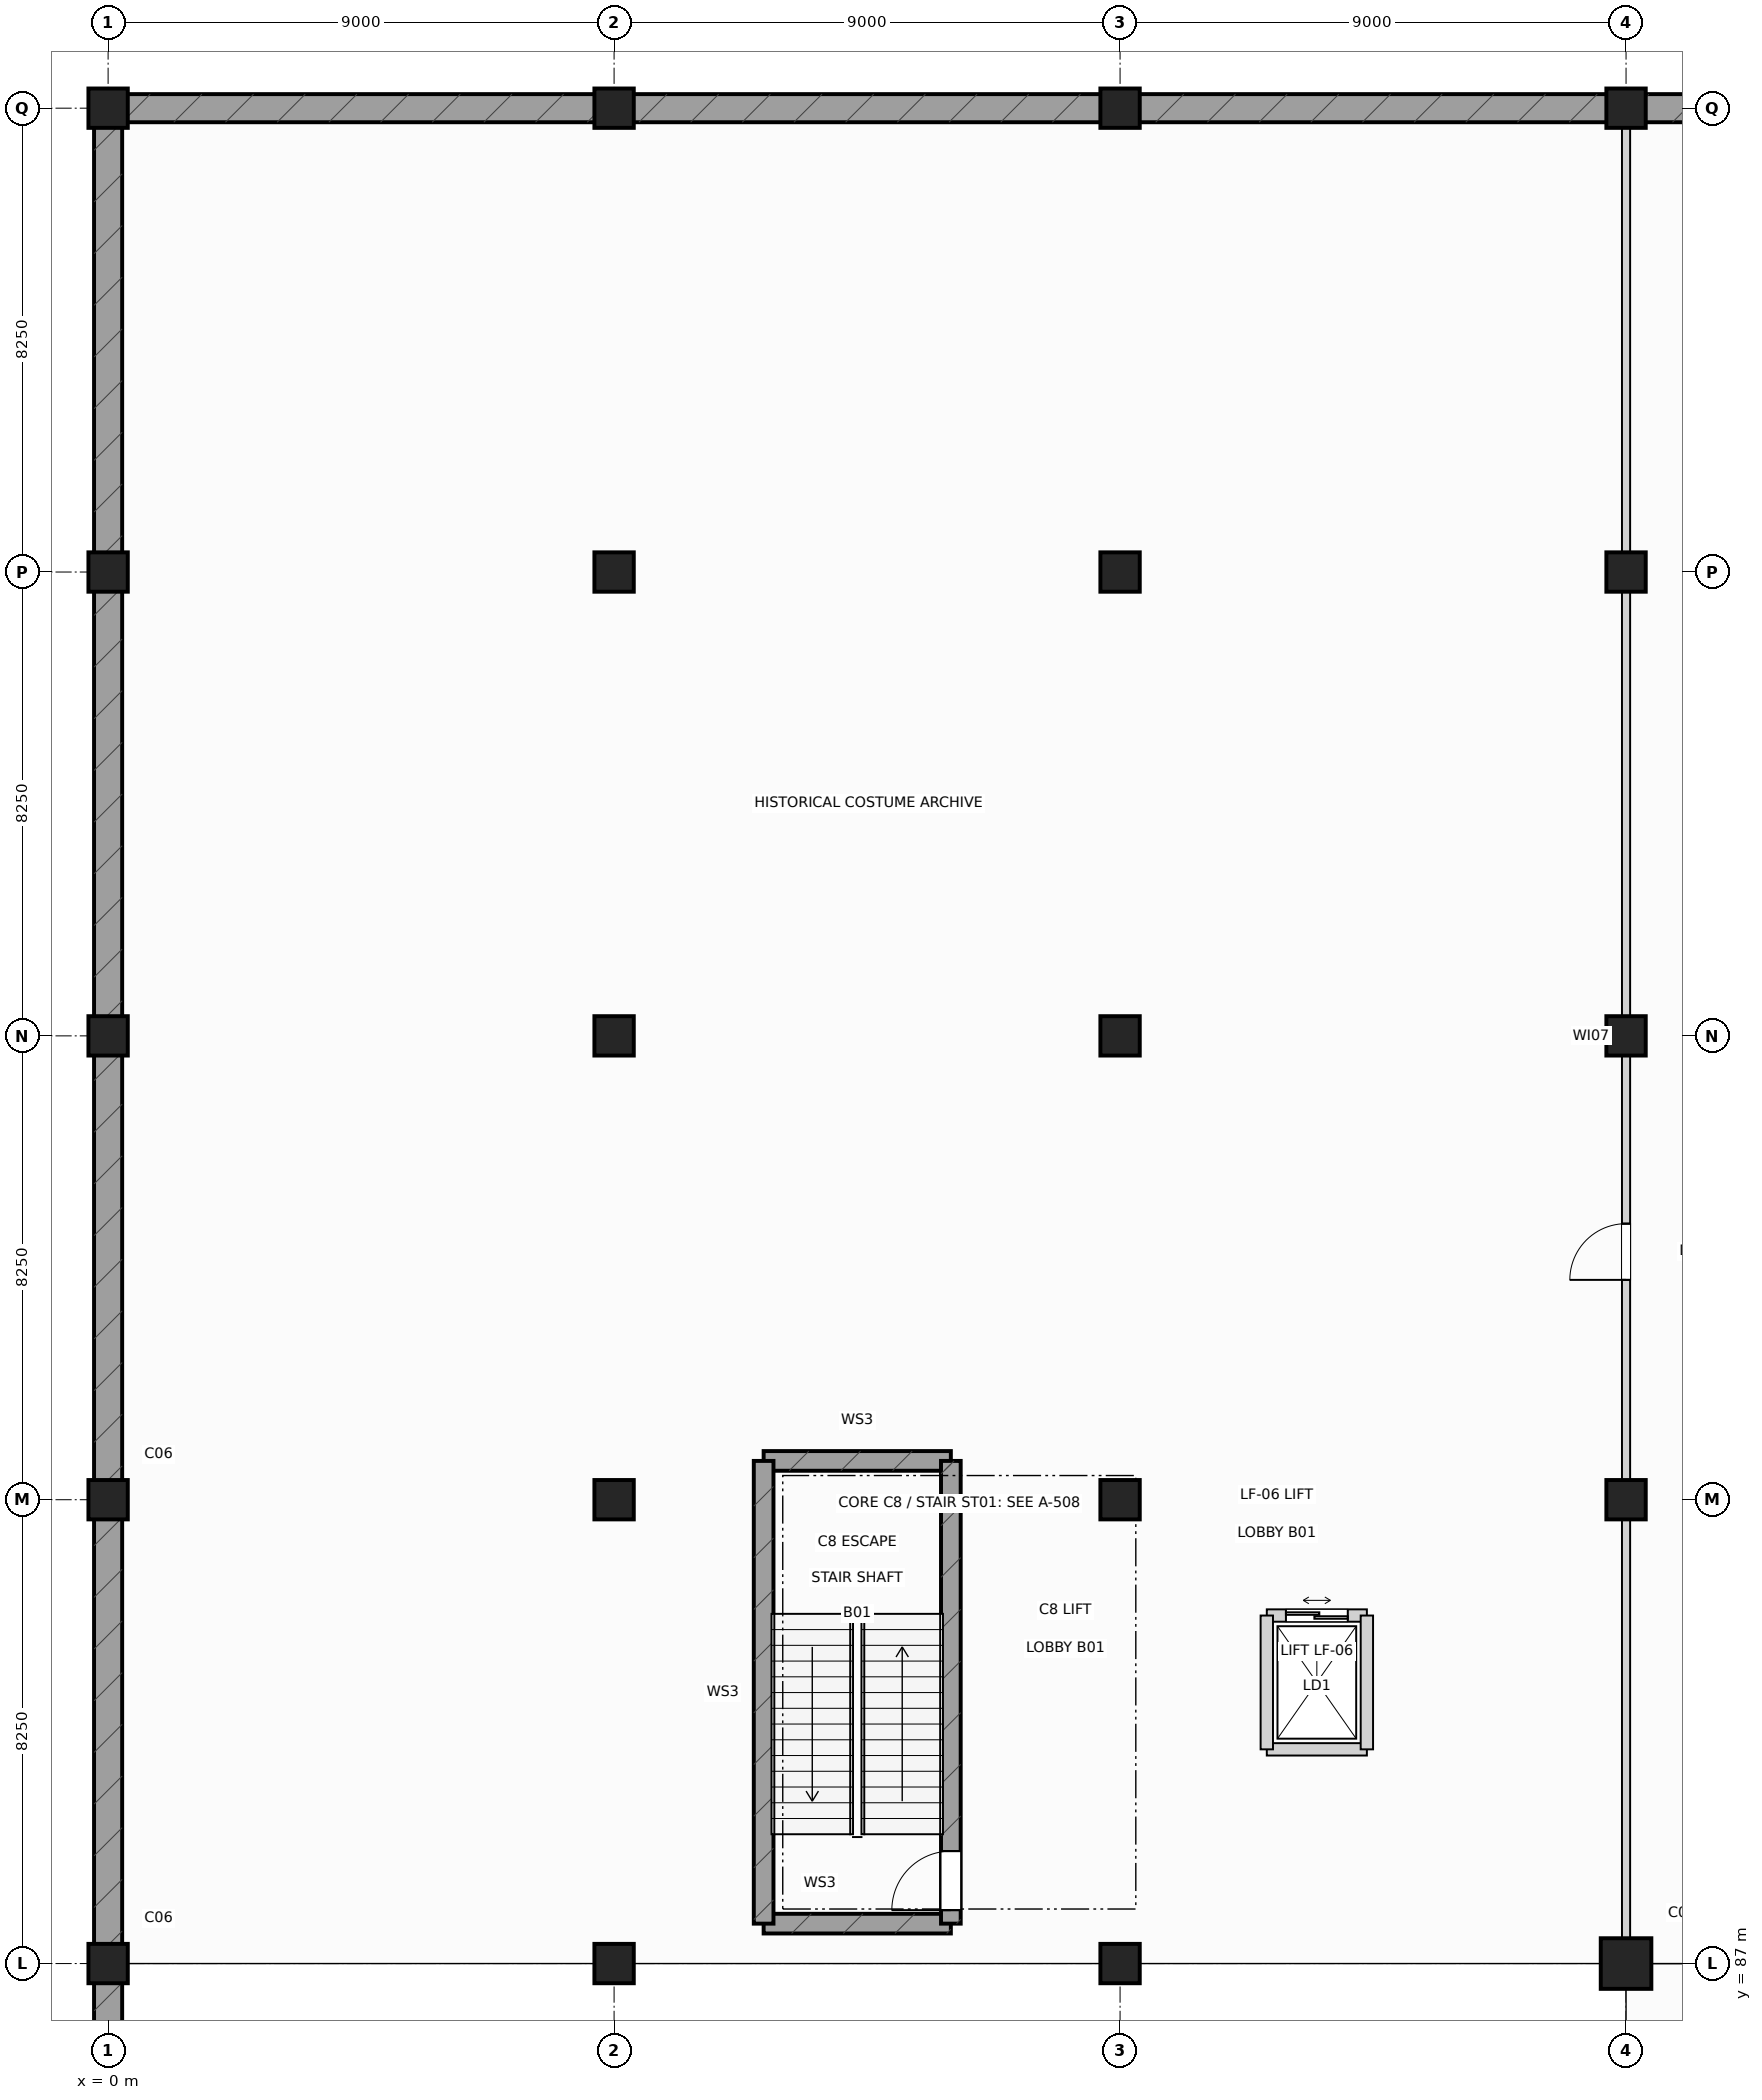
"""IFC4 building model, lengths in metres.
Left out: names, types, materials, properties, quantities, classifications, styles, units other than length and angle.
Written with IfcOpenShell. Run it as: python <this file> out.ifc"""

import sys

from ifc_helpers import new_model, si_unit, direction, frame, frame_2d, origin, origin_2d, place, context, subcontext, project, spatial, rectangle, hollow_circle, extrude, element, fill, save


model = new_model("IFC4")
c1 = context("Model", 3, precision=1e-05, world=origin(), true_north=direction((0.0, 1.0)))
c2 = subcontext(c1, "Body", "Model", "MODEL_VIEW")
j1 = project(units=[si_unit("LENGTHUNIT", "METRE"), si_unit("PLANEANGLEUNIT", "RADIAN")], contexts=[c1])
p1 = place(None, origin())
s1 = spatial("IfcSite", under=j1, at=p1, CompositionType="ELEMENT")
p2 = place(p1, origin())
s2 = spatial("IfcBuilding", under=s1, at=p2, CompositionType="ELEMENT")
p3 = place(p2, frame((0.0, 0.0, -5.4)))
s3 = spatial("IfcBuildingStorey", under=s2, at=p3, CompositionType="ELEMENT", Elevation=-5.4)
for number, where, z_axis, x_axis in (
    (1, (0.0, 87.0, 0.0), (0.0, 0.0, 1.0), (1.0, 0.0, 0.0)),
    (2, (0.0, 95.25, 0.0), (0.0, 0.0, 1.0), (1.0, 0.0, 0.0)),
    (3, (0.0, 103.5, 0.0), (0.0, 0.0, 1.0), (1.0, 0.0, 0.0)),
    (4, (0.0, 111.75, 0.0), (0.0, 0.0, 1.0), (1.0, 0.0, 0.0)),
    (5, (0.0, 120.0, 0.0), (0.0, 0.0, 1.0), (1.0, 0.0, 0.0)),
    (6, (9.0, 87.0, 0.0), (0.0, 0.0, 1.0), (1.0, 0.0, 0.0)),
    (7, (9.0, 95.25, 0.0), (0.0, 0.0, 1.0), (1.0, 0.0, 0.0)),
    (8, (9.0, 103.5, 0.0), (0.0, 0.0, 1.0), (1.0, 0.0, 0.0)),
    (9, (9.0, 111.75, 0.0), (0.0, 0.0, 1.0), (1.0, 0.0, 0.0)),
    (10, (9.0, 120.0, 0.0), (0.0, 0.0, 1.0), (1.0, 0.0, 0.0)),
    (11, (18.0, 87.0, 0.0), (0.0, 0.0, 1.0), (1.0, 0.0, 0.0)),
    (12, (18.0, 95.25, 0.0), (0.0, 0.0, 1.0), (1.0, 0.0, 0.0)),
    (13, (18.0, 103.5, 0.0), (0.0, 0.0, 1.0), (1.0, 0.0, 0.0)),
    (14, (18.0, 111.75, 0.0), (0.0, 0.0, 1.0), (1.0, 0.0, 0.0)),
    (15, (18.0, 120.0, 0.0), (0.0, 0.0, 1.0), (1.0, 0.0, 0.0)),
):
    element("IfcColumn", number, at=place(p3, frame(where, z_axis=z_axis, x_axis=x_axis)), inside=s3, PredefinedType="COLUMN", context=c2, shape_type="SweptSolid", body=[
        extrude(rectangle(XDim=0.7, YDim=0.7, at=origin_2d()), origin(), (0.0, 0.0, 1.0), 5.4),
    ])
p4 = place(p3, frame((27.0, 87.0, 0.0), z_axis=(0.0, 0.0, 1.0), x_axis=(1.0, 0.0, 0.0)))
e16 = element("IfcColumn", 16, at=p4, inside=s3, PredefinedType="COLUMN", context=c2, shape_type="SweptSolid", body=[
    extrude(rectangle(XDim=0.9, YDim=0.9, at=origin_2d()), origin(), (0.0, 0.0, 1.0), 5.4),
])
for number, where, z_axis, x_axis in (
    (17, (27.0, 95.25, 0.0), (0.0, 0.0, 1.0), (1.0, 0.0, 0.0)),
    (18, (27.0, 103.5, 0.0), (0.0, 0.0, 1.0), (1.0, 0.0, 0.0)),
    (19, (27.0, 111.75, 0.0), (0.0, 0.0, 1.0), (1.0, 0.0, 0.0)),
    (20, (27.0, 120.0, 0.0), (0.0, 0.0, 1.0), (1.0, 0.0, 0.0)),
):
    element("IfcColumn", number, at=place(p3, frame(where, z_axis=z_axis, x_axis=x_axis)), inside=s3, PredefinedType="COLUMN", context=c2, shape_type="SweptSolid", body=[
        extrude(rectangle(XDim=0.7, YDim=0.7, at=origin_2d()), origin(), (0.0, 0.0, 1.0), 5.4),
    ])
p5 = place(p3, frame((0.0, 0.0, 0.0), z_axis=(0.0, 0.0, 1.0), x_axis=(0.0, 1.0, 0.0)))
e21 = element("IfcWall", 21, at=p5, inside=s3, PredefinedType="USERDEFINED", context=c2, shape_type="SweptSolid", body=[
    extrude(rectangle(XDim=120.0, YDim=0.5, at=frame_2d((60.0, 0.0))), origin(), (0.0, 0.0, 1.0), 5.08),
])
p6 = place(p3, frame((0.0, 120.0, 0.0), z_axis=(0.0, 0.0, 1.0), x_axis=(1.0, 0.0, 0.0)))
e22 = element("IfcWall", 22, at=p6, inside=s3, PredefinedType="USERDEFINED", context=c2, shape_type="SweptSolid", body=[
    extrude(rectangle(XDim=81.0, YDim=0.5, at=frame_2d((40.5, 0.0))), origin(), (0.0, 0.0, 1.0), 5.08),
])
p7 = place(p3, frame((33.8, 80.2, 0.0), z_axis=(-0.371927502201, 0.371927502201, 0.850493895459), x_axis=(-0.707106781187, -0.707106781187, 0.0)))
e23 = element("IfcColumn", 23, at=p7, inside=s3, PredefinedType="COLUMN", context=c2, shape_type="SweptSolid", body=[
    extrude(hollow_circle(Radius=0.254, WallThickness=0.025, at=origin_2d()), origin(), (0.0, 0.0, 1.0), 18.283),
])
for number, where, z_axis, x_axis in (
    (24, (11.66, 87.71, 0.0), (0.0, 0.0, 1.0), (1.0, 0.0, 0.0)),
    (25, (11.66, 95.94, 0.0), (0.0, 0.0, 1.0), (1.0, 0.0, 0.0)),
):
    element("IfcWall", number, at=place(p3, frame(where, z_axis=z_axis, x_axis=x_axis)), inside=s3, PredefinedType="SHEAR", context=c2, shape_type="SweptSolid", body=[
        extrude(rectangle(XDim=3.33, YDim=0.35, at=frame_2d((1.665, 0.0))), origin(), (0.0, 0.0, 1.0), 5.08),
    ])
p8 = place(p3, frame((11.66, 87.71, 0.0), z_axis=(0.0, 0.0, 1.0), x_axis=(0.0, 1.0, 0.0)))
e26 = element("IfcWall", 26, at=p8, inside=s3, PredefinedType="SHEAR", context=c2, shape_type="SweptSolid", body=[
    extrude(rectangle(XDim=8.23, YDim=0.35, at=frame_2d((4.115, 0.0))), origin(), (0.0, 0.0, 1.0), 5.08),
])
p9 = place(p3, frame((14.99, 87.71, 0.0), z_axis=(0.0, 0.0, 1.0), x_axis=(0.0, 1.0, 0.0)))
e27 = element("IfcWall", 27, at=p9, inside=s3, PredefinedType="SHEAR", context=c2, shape_type="SweptSolid", body=[
    extrude(rectangle(XDim=8.23, YDim=0.35, at=frame_2d((4.115, 0.0))), origin(), (0.0, 0.0, 1.0), 5.08),
])
p10 = place(p9, frame((0.24, 0.0, 0.0)))
e28 = element("IfcOpeningElement", 28, at=p10, cuts=e27, PredefinedType="OPENING", context=c2, shape_type="SweptSolid", body=[
    extrude(rectangle(XDim=1.05, YDim=2.18, at=frame_2d((0.525, 1.09))), frame((0.0, 0.185, 0.0), z_axis=(0.0, -1.0, 0.0), x_axis=(1.0, 0.0, 0.0)), (0.0, 0.0, 1.0), 0.37),
])
p11 = place(p3, frame((20.61, 90.81, 0.0), z_axis=(0.0, 0.0, 1.0), x_axis=(1.0, 0.0, 0.0)))
e29 = element("IfcWall", 29, at=p11, inside=s3, PredefinedType="PARTITIONING", context=c2, shape_type="SweptSolid", body=[
    extrude(rectangle(XDim=1.78, YDim=0.22, at=frame_2d((0.89, 0.0))), origin(), (0.0, 0.0, 1.0), 5.045),
])
p12 = place(p3, frame((20.61, 93.19, 0.0), z_axis=(0.0, 0.0, 1.0), x_axis=(1.0, 0.0, 0.0)))
e30 = element("IfcWall", 30, at=p12, inside=s3, PredefinedType="PARTITIONING", context=c2, shape_type="SweptSolid", body=[
    extrude(rectangle(XDim=1.78, YDim=0.22, at=frame_2d((0.89, 0.0))), origin(), (0.0, 0.0, 1.0), 5.045),
])
p13 = place(p12, frame((0.34, 0.0, 0.0)))
e31 = element("IfcOpeningElement", 31, at=p13, cuts=e30, PredefinedType="OPENING", context=c2, shape_type="SweptSolid", body=[
    extrude(rectangle(XDim=1.1, YDim=2.18, at=frame_2d((0.55, 1.09))), frame((0.0, 0.12, 0.0), z_axis=(0.0, -1.0, 0.0), x_axis=(1.0, 0.0, 0.0)), (0.0, 0.0, 1.0), 0.24),
])
for number, where, z_axis, x_axis in (
    (32, (20.61, 90.81, 0.0), (0.0, 0.0, 1.0), (0.0, 1.0, 0.0)),
    (33, (22.39, 90.81, 0.0), (0.0, 0.0, 1.0), (0.0, 1.0, 0.0)),
):
    element("IfcWall", number, at=place(p3, frame(where, z_axis=z_axis, x_axis=x_axis)), inside=s3, PredefinedType="PARTITIONING", context=c2, shape_type="SweptSolid", body=[
        extrude(rectangle(XDim=2.38, YDim=0.22, at=frame_2d((1.19, 0.0))), origin(), (0.0, 0.0, 1.0), 4.775),
    ])
p14 = place(p3, frame((27.0, 87.0, 0.0), z_axis=(0.0, 0.0, 1.0), x_axis=(0.0, 1.0, 0.0)))
e34 = element("IfcWall", 34, at=p14, inside=s3, PredefinedType="PARTITIONING", context=c2, shape_type="SweptSolid", body=[
    extrude(rectangle(XDim=33.0, YDim=0.145, at=frame_2d((16.5, 0.0))), origin(), (0.0, 0.0, 1.0), 4.295),
])
p15 = place(p14, frame((12.16, 0.0, 0.0)))
e35 = element("IfcOpeningElement", 35, at=p15, cuts=e34, PredefinedType="OPENING", context=c2, shape_type="SweptSolid", body=[
    extrude(rectangle(XDim=1.0, YDim=2.12, at=frame_2d((0.5, 1.06))), frame((0.0, 0.083, 0.0), z_axis=(0.0, -1.0, 0.0), x_axis=(1.0, 0.0, 0.0)), (0.0, 0.0, 1.0), 0.165),
])
p16 = place(p10, origin())
e36 = element("IfcDoor", 36, at=p16, inside=s3, OperationType="SINGLE_SWING_LEFT", PredefinedType="DOOR", context=c2, shape_type="SweptSolid", body=[
    extrude(rectangle(XDim=1.05, YDim=2.18, at=frame_2d((0.525, 1.09))), frame((0.0, 0.025, 0.0), z_axis=(0.0, -1.0, 0.0), x_axis=(1.0, 0.0, 0.0)), (0.0, 0.0, 1.0), 0.05),
])
fill(e28, e36)
p17 = place(p13, origin())
e37 = element("IfcDoor", 37, at=p17, inside=s3, OperationType="DOUBLE_DOOR_SLIDING", PredefinedType="DOOR", context=c2, shape_type="SweptSolid", body=[
    extrude(rectangle(XDim=1.1, YDim=2.18, at=frame_2d((0.55, 1.09))), frame((0.0, 0.025, 0.0), z_axis=(0.0, -1.0, 0.0), x_axis=(1.0, 0.0, 0.0)), (0.0, 0.0, 1.0), 0.05),
])
fill(e31, e37)
p18 = place(p15, origin())
e38 = element("IfcDoor", 38, at=p18, inside=s3, OperationType="SINGLE_SWING_LEFT", PredefinedType="DOOR", context=c2, shape_type="SweptSolid", body=[
    extrude(rectangle(XDim=1.0, YDim=2.12, at=frame_2d((0.5, 1.06))), frame((0.0, 0.025, 0.0), z_axis=(0.0, -1.0, 0.0), x_axis=(1.0, 0.0, 0.0)), (0.0, 0.0, 1.0), 0.05),
])
fill(e35, e38)
save(model, sys.argv[1])
